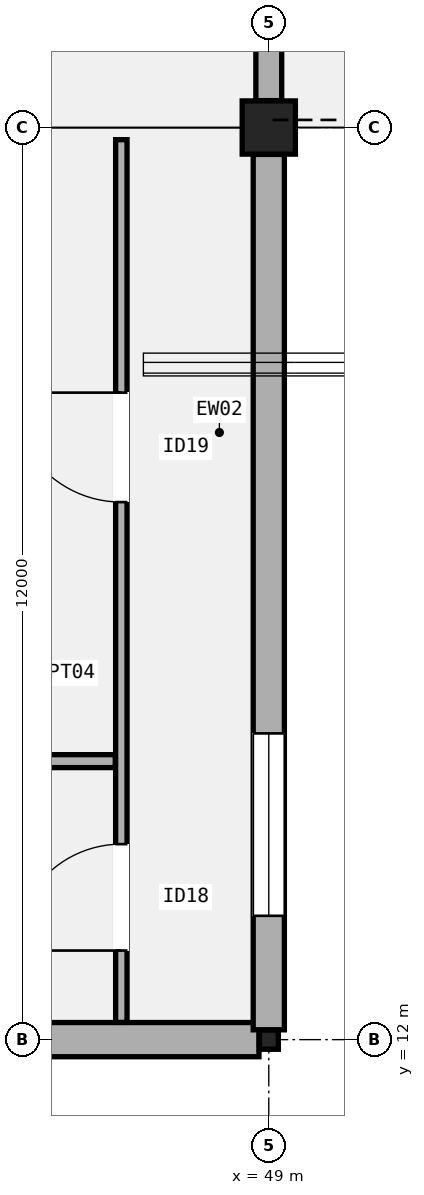
"""IFC4 building model, lengths in metres.
Left out: names, types, materials, properties, quantities, classifications, styles, units other than length and angle.
Written with IfcOpenShell. Run it as: python <this file> out.ifc"""

import sys

from ifc_helpers import new_model, si_unit, direction, frame, frame_2d, origin, origin_2d, place, context, subcontext, project, spatial, rectangle, hollow_rectangle, extrude, element, fill, save


model = new_model("IFC4")
c1 = context("Model", 3, precision=1e-05, world=origin(), true_north=direction((0.0, 1.0)))
c2 = subcontext(c1, "Body", "Model", "MODEL_VIEW")
j1 = project(units=[si_unit("LENGTHUNIT", "METRE"), si_unit("PLANEANGLEUNIT", "RADIAN")], contexts=[c1])
p1 = place(None, origin())
s1 = spatial("IfcSite", under=j1, at=p1, CompositionType="ELEMENT")
p2 = place(p1, origin())
s2 = spatial("IfcBuilding", under=s1, at=p2, CompositionType="ELEMENT")
p3 = place(p2, frame((0.0, 0.0, 20.4)))
s3 = spatial("IfcBuildingStorey", under=s2, at=p3, CompositionType="ELEMENT", Elevation=20.4)
p4 = place(p3, frame((49.0, 12.0, 0.0), z_axis=(0.0, 0.0, 1.0), x_axis=(1.0, 0.0, 0.0)))
e1 = element("IfcColumn", 1, at=p4, inside=s3, PredefinedType="COLUMN", context=c2, shape_type="SweptSolid", body=[
    extrude(hollow_rectangle(XDim=0.25, YDim=0.25, WallThickness=0.012, InnerFilletRadius=0.012, OuterFilletRadius=0.024, at=origin_2d()), origin(), (0.0, 0.0, 1.0), 5.4),
])
p5 = place(p3, frame((49.0, 24.0, 0.0), z_axis=(0.0, 0.0, 1.0), x_axis=(1.0, 0.0, 0.0)))
e2 = element("IfcColumn", 2, at=p5, inside=s3, PredefinedType="COLUMN", context=c2, shape_type="SweptSolid", body=[
    extrude(rectangle(XDim=0.7, YDim=0.7, at=origin_2d()), origin(), (0.0, 0.0, 1.0), 5.4),
])
p6 = place(p3, frame((36.654, 12.0, 0.0), z_axis=(0.0, 0.0, 1.0), x_axis=(1.0, 0.0, 0.0)))
e3 = element("IfcWall", 3, at=p6, inside=s3, PredefinedType="SOLIDWALL", context=c2, shape_type="SweptSolid", body=[
    extrude(rectangle(XDim=12.217, YDim=0.45, at=frame_2d((6.108, 0.0))), origin(), (0.0, 0.0, 1.0), 4.58),
])
p7 = place(p6, frame((1.5, 0.0, 0.95)))
e4 = element("IfcOpeningElement", 4, at=p7, cuts=e3, PredefinedType="OPENING", context=c2, shape_type="SweptSolid", body=[
    extrude(rectangle(XDim=2.4, YDim=1.65, at=frame_2d((1.2, 0.825))), frame((0.0, 0.235, 0.0), z_axis=(0.0, -1.0, 0.0), x_axis=(1.0, 0.0, 0.0)), (0.0, 0.0, 1.0), 0.47),
])
p8 = place(p3, frame((49.0, 12.129, 0.0), z_axis=(0.0, 0.0, 1.0), x_axis=(0.0, 1.0, 0.0)))
e5 = element("IfcWall", 5, at=p8, inside=s3, PredefinedType="SOLIDWALL", context=c2, shape_type="SweptSolid", body=[
    extrude(rectangle(XDim=11.517, YDim=0.41, at=frame_2d((5.759, 0.0))), origin(), (0.0, 0.0, 1.0), 4.592),
])
p9 = place(p8, frame((1.5, 0.0, 0.95)))
e6 = element("IfcOpeningElement", 6, at=p9, cuts=e5, PredefinedType="OPENING", context=c2, shape_type="SweptSolid", body=[
    extrude(rectangle(XDim=2.4, YDim=2.05, at=frame_2d((1.2, 1.025))), frame((0.0, 0.215, 0.0), z_axis=(0.0, -1.0, 0.0), x_axis=(1.0, 0.0, 0.0)), (0.0, 0.0, 1.0), 0.43),
])
p10 = place(p3, frame((49.0, 24.354, 0.0), z_axis=(0.0, 0.0, 1.0), x_axis=(0.0, 1.0, 0.0)))
e7 = element("IfcWall", 7, at=p10, inside=s3, PredefinedType="SOLIDWALL", context=c2, shape_type="SweptSolid", body=[
    extrude(rectangle(XDim=11.342, YDim=0.34, at=frame_2d((5.671, 0.0))), origin(), (0.0, 0.0, 1.0), 4.48),
])
p11 = place(p10, frame((5.14, 0.0, 0.0), z_axis=(0.0, 0.0, 1.0), x_axis=(-1.0, 0.0, 0.0)))
e8 = element("IfcOpeningElement", 8, at=p11, cuts=e7, PredefinedType="OPENING", context=c2, shape_type="SweptSolid", body=[
    extrude(rectangle(XDim=1.8, YDim=2.3, at=frame_2d((0.9, 1.15))), frame((0.0, 0.18, 0.0), z_axis=(0.0, -1.0, 0.0), x_axis=(1.0, 0.0, 0.0)), (0.0, 0.0, 1.0), 0.36),
])
p12 = place(p3, frame((47.06, 12.227, 0.0), z_axis=(0.0, 0.0, 1.0), x_axis=(0.0, 1.0, 0.0)))
e9 = element("IfcWall", 9, at=p12, inside=s3, PredefinedType="PARTITIONING", context=c2, shape_type="SweptSolid", body=[
    extrude(rectangle(XDim=11.613, YDim=0.15, at=frame_2d((5.807, 0.0))), origin(), (0.0, 0.0, 1.0), 4.52),
])
p13 = place(p12, frame((0.945, 0.0, 0.0)))
e10 = element("IfcOpeningElement", 10, at=p13, cuts=e9, PredefinedType="OPENING", context=c2, shape_type="SweptSolid", body=[
    extrude(rectangle(XDim=1.4, YDim=2.24, at=frame_2d((0.7, 1.12))), frame((0.0, 0.085, 0.0), z_axis=(0.0, -1.0, 0.0), x_axis=(1.0, 0.0, 0.0)), (0.0, 0.0, 1.0), 0.17),
])
p14 = place(p12, frame((6.845, 0.0, 0.0)))
e11 = element("IfcOpeningElement", 11, at=p14, cuts=e9, PredefinedType="OPENING", context=c2, shape_type="SweptSolid", body=[
    extrude(rectangle(XDim=1.44, YDim=2.26, at=frame_2d((0.72, 1.13))), frame((0.0, 0.085, 0.0), z_axis=(0.0, -1.0, 0.0), x_axis=(1.0, 0.0, 0.0)), (0.0, 0.0, 1.0), 0.17),
])
p15 = place(p3, frame((36.58, 15.664, 0.0), z_axis=(0.0, 0.0, 1.0), x_axis=(1.0, 0.0, 0.0)))
e12 = element("IfcWall", 12, at=p15, inside=s3, PredefinedType="PARTITIONING", context=c2, shape_type="SweptSolid", body=[
    extrude(rectangle(XDim=10.4, YDim=0.17, at=frame_2d((5.2, 0.0))), origin(), (0.0, 0.0, 1.0), 4.52),
])
p16 = place(p9, origin())
e13 = element("IfcWindow", 13, at=p16, inside=s3, PartitioningType="SINGLE_PANEL", PredefinedType="WINDOW", context=c2, shape_type="SweptSolid", body=[
    extrude(rectangle(XDim=2.4, YDim=2.05, at=frame_2d((1.2, 1.025))), frame((0.0, 0.03, 0.0), z_axis=(0.0, -1.0, 0.0), x_axis=(1.0, 0.0, 0.0)), (0.0, 0.0, 1.0), 0.06),
])
fill(e6, e13)
p17 = place(p13, origin())
e14 = element("IfcDoor", 14, at=p17, inside=s3, OperationType="SINGLE_SWING_LEFT", PredefinedType="DOOR", context=c2, shape_type="SweptSolid", body=[
    extrude(rectangle(XDim=1.4, YDim=2.24, at=frame_2d((0.7, 1.12))), frame((0.0, 0.025, 0.0), z_axis=(0.0, -1.0, 0.0), x_axis=(1.0, 0.0, 0.0)), (0.0, 0.0, 1.0), 0.05),
])
fill(e10, e14)
p18 = place(p14, origin())
e15 = element("IfcDoor", 15, at=p18, inside=s3, OperationType="SINGLE_SWING_RIGHT", PredefinedType="DOOR", context=c2, shape_type="SweptSolid", body=[
    extrude(rectangle(XDim=1.44, YDim=2.26, at=frame_2d((0.72, 1.13))), frame((0.0, 0.025, 0.0), z_axis=(0.0, -1.0, 0.0), x_axis=(1.0, 0.0, 0.0)), (0.0, 0.0, 1.0), 0.05),
])
fill(e11, e15)
save(model, sys.argv[1])
